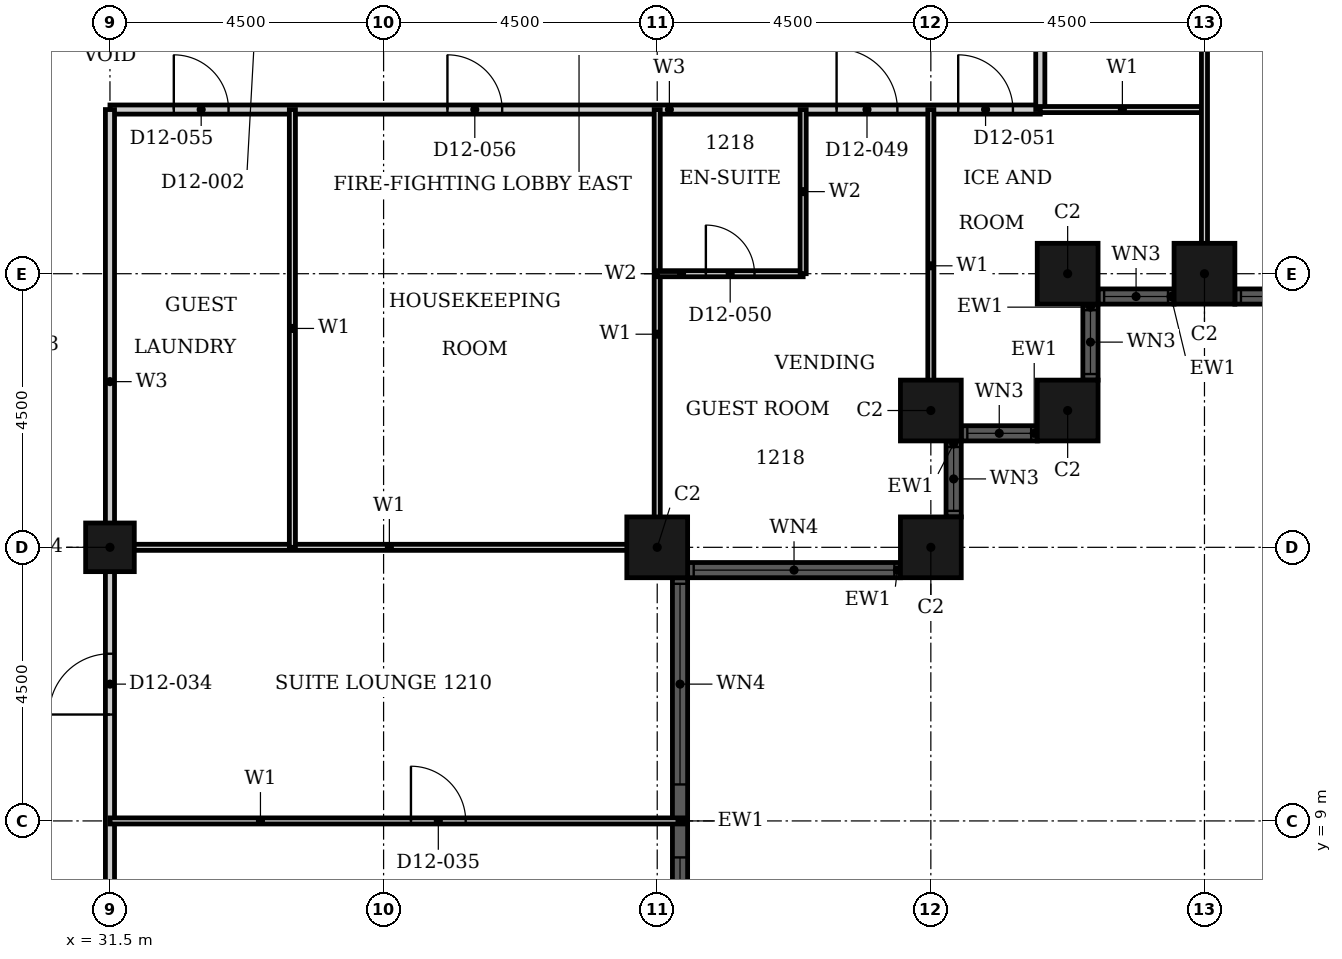
"""IFC4 building model, lengths in metres.
Left out: names, types, materials, properties, quantities, classifications, styles, units other than length and angle.
Written with IfcOpenShell. Run it as: python <this file> out.ifc"""

import sys

from ifc_helpers import new_model, si_unit, direction, frame, frame_2d, origin, origin_2d, place, context, subcontext, project, spatial, rectangle, hollow_rectangle, extrude, element, fill, save


model = new_model("IFC4")
c1 = context("Model", 3, precision=1e-05, world=origin(), true_north=direction((0.0, 1.0)))
c2 = subcontext(c1, "Body", "Model", "MODEL_VIEW")
j1 = project(units=[si_unit("LENGTHUNIT", "METRE"), si_unit("PLANEANGLEUNIT", "RADIAN")], contexts=[c1])
p1 = place(None, origin())
s1 = spatial("IfcSite", under=j1, at=p1, CompositionType="ELEMENT")
p2 = place(p1, origin())
s2 = spatial("IfcBuilding", under=s1, at=p2, CompositionType="ELEMENT")
p3 = place(p2, frame((0.0, 0.0, 56.4)))
s3 = spatial("IfcBuildingStorey", under=s2, at=p3, CompositionType="ELEMENT", Elevation=56.4)
for number, where, z_axis, x_axis in (
    (1, (40.5, 13.5, 0.0), (0.0, 0.0, 1.0), (1.0, 0.0, 0.0)),
    (2, (45.0, 13.5, 0.0), (0.0, 0.0, 1.0), (1.0, 0.0, 0.0)),
    (3, (45.0, 15.75, 0.0), (0.0, 0.0, 1.0), (1.0, 0.0, 0.0)),
    (4, (47.25, 15.75, 0.0), (0.0, 0.0, 1.0), (1.0, 0.0, 0.0)),
    (5, (47.25, 18.0, 0.0), (0.0, 0.0, 1.0), (1.0, 0.0, 0.0)),
    (6, (49.5, 18.0, 0.0), (0.0, 0.0, 1.0), (1.0, 0.0, 0.0)),
):
    element("IfcColumn", number, at=place(p3, frame(where, z_axis=z_axis, x_axis=x_axis)), inside=s3, PredefinedType="COLUMN", context=c2, shape_type="SweptSolid", body=[
        extrude(hollow_rectangle(XDim=1.0, YDim=1.0, WallThickness=0.032, at=origin_2d()), origin(), (0.0, 0.0, 1.0), 3.6),
    ])
p4 = place(p3, frame((31.5, 13.5, 0.0), z_axis=(0.0, 0.0, 1.0), x_axis=(1.0, 0.0, 0.0)))
e7 = element("IfcColumn", 7, at=p4, inside=s3, PredefinedType="COLUMN", context=c2, shape_type="SweptSolid", body=[
    extrude(hollow_rectangle(XDim=0.8, YDim=0.8, WallThickness=0.025, at=origin_2d()), origin(), (0.0, 0.0, 1.0), 3.6),
])
p5 = place(p3, frame((40.875, 5.0, 0.0), z_axis=(0.0, 0.0, 1.0), x_axis=(0.0, 1.0, 0.0)))
e8 = element("IfcWall", 8, at=p5, inside=s3, PredefinedType="SOLIDWALL", context=c2, shape_type="SweptSolid", body=[
    extrude(rectangle(XDim=8.0, YDim=0.25, at=frame_2d((4.0, 0.0))), origin(), (0.0, 0.0, 1.0), 3.6),
])
p6 = place(p5, frame((0.1, 0.0, 0.9)))
e9 = element("IfcOpeningElement", 9, at=p6, cuts=e8, PredefinedType="OPENING", context=c2, shape_type="SweptSolid", body=[
    extrude(rectangle(XDim=3.3, YDim=2.08, at=frame_2d((1.65, 1.04))), frame((0.0, 0.135, 0.0), z_axis=(0.0, -1.0, 0.0), x_axis=(1.0, 0.0, 0.0)), (0.0, 0.0, 1.0), 0.27),
])
p7 = place(p5, frame((4.6, 0.0, 0.9)))
e10 = element("IfcOpeningElement", 10, at=p7, cuts=e8, PredefinedType="OPENING", context=c2, shape_type="SweptSolid", body=[
    extrude(rectangle(XDim=3.3, YDim=2.08, at=frame_2d((1.65, 1.04))), frame((0.0, 0.135, 0.0), z_axis=(0.0, -1.0, 0.0), x_axis=(1.0, 0.0, 0.0)), (0.0, 0.0, 1.0), 0.27),
])
p8 = place(p3, frame((41.0, 13.125, 0.0), z_axis=(0.0, 0.0, 1.0), x_axis=(1.0, 0.0, 0.0)))
e11 = element("IfcWall", 11, at=p8, inside=s3, PredefinedType="SOLIDWALL", context=c2, shape_type="SweptSolid", body=[
    extrude(rectangle(XDim=3.5, YDim=0.25, at=frame_2d((1.75, 0.0))), origin(), (0.0, 0.0, 1.0), 3.6),
])
p9 = place(p8, frame((0.1, 0.0, 0.9)))
e12 = element("IfcOpeningElement", 12, at=p9, cuts=e11, PredefinedType="OPENING", context=c2, shape_type="SweptSolid", body=[
    extrude(rectangle(XDim=3.3, YDim=2.08, at=frame_2d((1.65, 1.04))), frame((0.0, 0.135, 0.0), z_axis=(0.0, -1.0, 0.0), x_axis=(1.0, 0.0, 0.0)), (0.0, 0.0, 1.0), 0.27),
])
p10 = place(p3, frame((45.375, 14.0, 0.0), z_axis=(0.0, 0.0, 1.0), x_axis=(0.0, 1.0, 0.0)))
e13 = element("IfcWall", 13, at=p10, inside=s3, PredefinedType="SOLIDWALL", context=c2, shape_type="SweptSolid", body=[
    extrude(rectangle(XDim=1.25, YDim=0.25, at=frame_2d((0.625, 0.0))), origin(), (0.0, 0.0, 1.0), 3.6),
])
p11 = place(p10, frame((0.1, 0.0, 0.9)))
e14 = element("IfcOpeningElement", 14, at=p11, cuts=e13, PredefinedType="OPENING", context=c2, shape_type="SweptSolid", body=[
    extrude(rectangle(XDim=1.05, YDim=2.08, at=frame_2d((0.525, 1.04))), frame((0.0, 0.135, 0.0), z_axis=(0.0, -1.0, 0.0), x_axis=(1.0, 0.0, 0.0)), (0.0, 0.0, 1.0), 0.27),
])
p12 = place(p3, frame((45.5, 15.375, 0.0), z_axis=(0.0, 0.0, 1.0), x_axis=(1.0, 0.0, 0.0)))
e15 = element("IfcWall", 15, at=p12, inside=s3, PredefinedType="SOLIDWALL", context=c2, shape_type="SweptSolid", body=[
    extrude(rectangle(XDim=1.25, YDim=0.25, at=frame_2d((0.625, 0.0))), origin(), (0.0, 0.0, 1.0), 3.6),
])
p13 = place(p12, frame((0.1, 0.0, 0.9)))
e16 = element("IfcOpeningElement", 16, at=p13, cuts=e15, PredefinedType="OPENING", context=c2, shape_type="SweptSolid", body=[
    extrude(rectangle(XDim=1.05, YDim=2.08, at=frame_2d((0.525, 1.04))), frame((0.0, 0.135, 0.0), z_axis=(0.0, -1.0, 0.0), x_axis=(1.0, 0.0, 0.0)), (0.0, 0.0, 1.0), 0.27),
])
p14 = place(p3, frame((47.625, 16.25, 0.0), z_axis=(0.0, 0.0, 1.0), x_axis=(0.0, 1.0, 0.0)))
e17 = element("IfcWall", 17, at=p14, inside=s3, PredefinedType="SOLIDWALL", context=c2, shape_type="SweptSolid", body=[
    extrude(rectangle(XDim=1.25, YDim=0.25, at=frame_2d((0.625, 0.0))), origin(), (0.0, 0.0, 1.0), 3.6),
])
p15 = place(p14, frame((0.1, 0.0, 0.9)))
e18 = element("IfcOpeningElement", 18, at=p15, cuts=e17, PredefinedType="OPENING", context=c2, shape_type="SweptSolid", body=[
    extrude(rectangle(XDim=1.05, YDim=2.08, at=frame_2d((0.525, 1.04))), frame((0.0, 0.135, 0.0), z_axis=(0.0, -1.0, 0.0), x_axis=(1.0, 0.0, 0.0)), (0.0, 0.0, 1.0), 0.27),
])
p16 = place(p3, frame((47.75, 17.625, 0.0), z_axis=(0.0, 0.0, 1.0), x_axis=(1.0, 0.0, 0.0)))
e19 = element("IfcWall", 19, at=p16, inside=s3, PredefinedType="SOLIDWALL", context=c2, shape_type="SweptSolid", body=[
    extrude(rectangle(XDim=1.25, YDim=0.25, at=frame_2d((0.625, 0.0))), origin(), (0.0, 0.0, 1.0), 3.6),
])
p17 = place(p16, frame((0.1, 0.0, 0.9)))
e20 = element("IfcOpeningElement", 20, at=p17, cuts=e19, PredefinedType="OPENING", context=c2, shape_type="SweptSolid", body=[
    extrude(rectangle(XDim=1.05, YDim=2.08, at=frame_2d((0.525, 1.04))), frame((0.0, 0.135, 0.0), z_axis=(0.0, -1.0, 0.0), x_axis=(1.0, 0.0, 0.0)), (0.0, 0.0, 1.0), 0.27),
])
p18 = place(p3, frame((50.0, 17.625, 0.0), z_axis=(0.0, 0.0, 1.0), x_axis=(1.0, 0.0, 0.0)))
e21 = element("IfcWall", 21, at=p18, inside=s3, PredefinedType="SOLIDWALL", context=c2, shape_type="SweptSolid", body=[
    extrude(rectangle(XDim=8.0, YDim=0.25, at=frame_2d((4.0, 0.0))), origin(), (0.0, 0.0, 1.0), 3.6),
])
p19 = place(p18, frame((0.1, 0.0, 0.9)))
e22 = element("IfcOpeningElement", 22, at=p19, cuts=e21, PredefinedType="OPENING", context=c2, shape_type="SweptSolid", body=[
    extrude(rectangle(XDim=3.3, YDim=2.08, at=frame_2d((1.65, 1.04))), frame((0.0, 0.135, 0.0), z_axis=(0.0, -1.0, 0.0), x_axis=(1.0, 0.0, 0.0)), (0.0, 0.0, 1.0), 0.27),
])
p20 = place(p18, frame((4.6, 0.0, 0.9)))
e23 = element("IfcOpeningElement", 23, at=p20, cuts=e21, PredefinedType="OPENING", context=c2, shape_type="SweptSolid", body=[
    extrude(rectangle(XDim=3.3, YDim=2.08, at=frame_2d((1.65, 1.04))), frame((0.0, 0.135, 0.0), z_axis=(0.0, -1.0, 0.0), x_axis=(1.0, 0.0, 0.0)), (0.0, 0.0, 1.0), 0.27),
])
p21 = place(p3, frame((31.5, 20.7, 0.0), z_axis=(0.0, 0.0, 1.0), x_axis=(1.0, 0.0, 0.0)))
e24 = element("IfcWall", 24, at=p21, inside=s3, PredefinedType="PARTITIONING", context=c2, shape_type="SweptSolid", body=[
    extrude(rectangle(XDim=15.3, YDim=0.15, at=frame_2d((7.65, 0.0))), origin(), (0.0, 0.0, 1.0), 3.3),
])
p22 = place(p21, frame((11.95, 0.0, 0.0)))
e25 = element("IfcOpeningElement", 25, at=p22, cuts=e24, PredefinedType="OPENING", context=c2, shape_type="SweptSolid", body=[
    extrude(rectangle(XDim=1.0, YDim=2.1, at=frame_2d((0.5, 1.05))), frame((0.0, 0.085, 0.0), z_axis=(0.0, -1.0, 0.0), x_axis=(1.0, 0.0, 0.0)), (0.0, 0.0, 1.0), 0.17),
])
p23 = place(p21, frame((13.95, 0.0, 0.0)))
e26 = element("IfcOpeningElement", 26, at=p23, cuts=e24, PredefinedType="OPENING", context=c2, shape_type="SweptSolid", body=[
    extrude(rectangle(XDim=0.9, YDim=2.1, at=frame_2d((0.45, 1.05))), frame((0.0, 0.085, 0.0), z_axis=(0.0, -1.0, 0.0), x_axis=(1.0, 0.0, 0.0)), (0.0, 0.0, 1.0), 0.17),
])
p24 = place(p21, frame((1.05, 0.0, 0.0)))
e27 = element("IfcOpeningElement", 27, at=p24, cuts=e24, PredefinedType="OPENING", context=c2, shape_type="SweptSolid", body=[
    extrude(rectangle(XDim=0.9, YDim=2.1, at=frame_2d((0.45, 1.05))), frame((0.0, 0.085, 0.0), z_axis=(0.0, -1.0, 0.0), x_axis=(1.0, 0.0, 0.0)), (0.0, 0.0, 1.0), 0.17),
])
p25 = place(p21, frame((5.55, 0.0, 0.0)))
e28 = element("IfcOpeningElement", 28, at=p25, cuts=e24, PredefinedType="OPENING", context=c2, shape_type="SweptSolid", body=[
    extrude(rectangle(XDim=0.9, YDim=2.1, at=frame_2d((0.45, 1.05))), frame((0.0, 0.085, 0.0), z_axis=(0.0, -1.0, 0.0), x_axis=(1.0, 0.0, 0.0)), (0.0, 0.0, 1.0), 0.17),
])
p26 = place(p3, frame((31.5, 4.5, 0.0), z_axis=(0.0, 0.0, 1.0), x_axis=(0.0, 1.0, 0.0)))
e29 = element("IfcWall", 29, at=p26, inside=s3, PredefinedType="PARTITIONING", context=c2, shape_type="SweptSolid", body=[
    extrude(rectangle(XDim=16.2, YDim=0.15, at=frame_2d((8.1, 0.0))), origin(), (0.0, 0.0, 1.0), 2.58),
])
p27 = place(p26, frame((6.25, 0.0, 0.0)))
e30 = element("IfcOpeningElement", 30, at=p27, cuts=e29, PredefinedType="OPENING", context=c2, shape_type="SweptSolid", body=[
    extrude(rectangle(XDim=1.0, YDim=2.1, at=frame_2d((0.5, 1.05))), frame((0.0, 0.085, 0.0), z_axis=(0.0, -1.0, 0.0), x_axis=(1.0, 0.0, 0.0)), (0.0, 0.0, 1.0), 0.17),
])
p28 = place(p3, frame((46.8, 20.7, 0.0), z_axis=(0.0, 0.0, 1.0), x_axis=(0.0, 1.0, 0.0)))
e31 = element("IfcWall", 31, at=p28, inside=s3, PredefinedType="PARTITIONING", context=c2, shape_type="SweptSolid", body=[
    extrude(rectangle(XDim=6.3, YDim=0.15, at=frame_2d((3.15, 0.0))), origin(), (0.0, 0.0, 1.0), 3.3),
])
p29 = place(p28, frame((2.625, 0.0, 0.0)))
e32 = element("IfcOpeningElement", 32, at=p29, cuts=e31, PredefinedType="OPENING", context=c2, shape_type="SweptSolid", body=[
    extrude(rectangle(XDim=0.95, YDim=2.1, at=frame_2d((0.475, 1.05))), frame((0.0, 0.085, 0.0), z_axis=(0.0, -1.0, 0.0), x_axis=(1.0, 0.0, 0.0)), (0.0, 0.0, 1.0), 0.17),
])
p30 = place(p3, frame((31.5, 13.5, 0.0), z_axis=(0.0, 0.0, 1.0), x_axis=(1.0, 0.0, 0.0)))
e33 = element("IfcWall", 33, at=p30, inside=s3, PredefinedType="PARTITIONING", context=c2, shape_type="SweptSolid", body=[
    extrude(rectangle(XDim=9.19, YDim=0.1, at=frame_2d((4.595, 0.0))), origin(), (0.0, 0.0, 1.0), 2.38),
])
p31 = place(p3, frame((46.8, 20.7, 0.0), z_axis=(0.0, 0.0, 1.0), x_axis=(1.0, 0.0, 0.0)))
e34 = element("IfcWall", 34, at=p31, inside=s3, PredefinedType="PARTITIONING", context=c2, shape_type="SweptSolid", body=[
    extrude(rectangle(XDim=2.7, YDim=0.1, at=frame_2d((1.35, 0.0))), origin(), (0.0, 0.0, 1.0), 3.3),
])
p32 = place(p3, frame((31.5, 9.0, 0.0), z_axis=(0.0, 0.0, 1.0), x_axis=(1.0, 0.0, 0.0)))
e35 = element("IfcWall", 35, at=p32, inside=s3, PredefinedType="PARTITIONING", context=c2, shape_type="SweptSolid", body=[
    extrude(rectangle(XDim=9.44, YDim=0.1, at=frame_2d((4.72, 0.0))), origin(), (0.0, 0.0, 1.0), 3.3),
])
p33 = place(p32, frame((4.95, 0.0, 0.0)))
e36 = element("IfcOpeningElement", 36, at=p33, cuts=e35, PredefinedType="OPENING", context=c2, shape_type="SweptSolid", body=[
    extrude(rectangle(XDim=0.9, YDim=2.1, at=frame_2d((0.45, 1.05))), frame((0.0, 0.06, 0.0), z_axis=(0.0, -1.0, 0.0), x_axis=(1.0, 0.0, 0.0)), (0.0, 0.0, 1.0), 0.12),
])
p34 = place(p3, frame((34.5, 13.5, 0.0), z_axis=(0.0, 0.0, 1.0), x_axis=(0.0, 1.0, 0.0)))
e37 = element("IfcWall", 37, at=p34, inside=s3, PredefinedType="PARTITIONING", context=c2, shape_type="SweptSolid", body=[
    extrude(rectangle(XDim=7.2, YDim=0.1, at=frame_2d((3.6, 0.0))), origin(), (0.0, 0.0, 1.0), 3.3),
])
p35 = place(p3, frame((40.5, 13.31, 0.0), z_axis=(0.0, 0.0, 1.0), x_axis=(0.0, 1.0, 0.0)))
e38 = element("IfcWall", 38, at=p35, inside=s3, PredefinedType="PARTITIONING", context=c2, shape_type="SweptSolid", body=[
    extrude(rectangle(XDim=7.39, YDim=0.1, at=frame_2d((3.695, 0.0))), origin(), (0.0, 0.0, 1.0), 3.3),
])
p36 = place(p3, frame((45.0, 15.56, 0.0), z_axis=(0.0, 0.0, 1.0), x_axis=(0.0, 1.0, 0.0)))
e39 = element("IfcWall", 39, at=p36, inside=s3, PredefinedType="PARTITIONING", context=c2, shape_type="SweptSolid", body=[
    extrude(rectangle(XDim=5.14, YDim=0.1, at=frame_2d((2.57, 0.0))), origin(), (0.0, 0.0, 1.0), 3.3),
])
p37 = place(p3, frame((49.5, 17.81, 0.0), z_axis=(0.0, 0.0, 1.0), x_axis=(0.0, 1.0, 0.0)))
e40 = element("IfcWall", 40, at=p37, inside=s3, PredefinedType="PARTITIONING", context=c2, shape_type="SweptSolid", body=[
    extrude(rectangle(XDim=9.19, YDim=0.1, at=frame_2d((4.595, 0.0))), origin(), (0.0, 0.0, 1.0), 2.38),
])
p38 = place(p3, frame((40.5, 18.0, 0.0), z_axis=(0.0, 0.0, 1.0), x_axis=(1.0, 0.0, 0.0)))
e41 = element("IfcWall", 41, at=p38, inside=s3, PredefinedType="PARTITIONING", context=c2, shape_type="SweptSolid", body=[
    extrude(rectangle(XDim=2.4, YDim=0.1, at=frame_2d((1.2, 0.0))), origin(), (0.0, 0.0, 1.0), 3.3),
])
p39 = place(p38, frame((0.8, 0.0, 0.0)))
e42 = element("IfcOpeningElement", 42, at=p39, cuts=e41, PredefinedType="OPENING", context=c2, shape_type="SweptSolid", body=[
    extrude(rectangle(XDim=0.8, YDim=2.1, at=frame_2d((0.4, 1.05))), frame((0.0, 0.06, 0.0), z_axis=(0.0, -1.0, 0.0), x_axis=(1.0, 0.0, 0.0)), (0.0, 0.0, 1.0), 0.12),
])
p40 = place(p3, frame((42.9, 18.0, 0.0), z_axis=(0.0, 0.0, 1.0), x_axis=(0.0, 1.0, 0.0)))
e43 = element("IfcWall", 43, at=p40, inside=s3, PredefinedType="PARTITIONING", context=c2, shape_type="SweptSolid", body=[
    extrude(rectangle(XDim=2.7, YDim=0.1, at=frame_2d((1.35, 0.0))), origin(), (0.0, 0.0, 1.0), 3.3),
])
p41 = place(p6, origin())
e44 = element("IfcWindow", 44, at=p41, inside=s3, PartitioningType="SINGLE_PANEL", PredefinedType="WINDOW", context=c2, shape_type="SweptSolid", body=[
    extrude(rectangle(XDim=3.3, YDim=2.08, at=frame_2d((1.65, 1.04))), frame((0.0, 0.03, 0.0), z_axis=(0.0, -1.0, 0.0), x_axis=(1.0, 0.0, 0.0)), (0.0, 0.0, 1.0), 0.06),
])
fill(e9, e44)
p42 = place(p7, origin())
e45 = element("IfcWindow", 45, at=p42, inside=s3, PartitioningType="SINGLE_PANEL", PredefinedType="WINDOW", context=c2, shape_type="SweptSolid", body=[
    extrude(rectangle(XDim=3.3, YDim=2.08, at=frame_2d((1.65, 1.04))), frame((0.0, 0.03, 0.0), z_axis=(0.0, -1.0, 0.0), x_axis=(1.0, 0.0, 0.0)), (0.0, 0.0, 1.0), 0.06),
])
fill(e10, e45)
p43 = place(p9, origin())
e46 = element("IfcWindow", 46, at=p43, inside=s3, PartitioningType="SINGLE_PANEL", PredefinedType="WINDOW", context=c2, shape_type="SweptSolid", body=[
    extrude(rectangle(XDim=3.3, YDim=2.08, at=frame_2d((1.65, 1.04))), frame((0.0, 0.03, 0.0), z_axis=(0.0, -1.0, 0.0), x_axis=(1.0, 0.0, 0.0)), (0.0, 0.0, 1.0), 0.06),
])
fill(e12, e46)
p44 = place(p11, origin())
e47 = element("IfcWindow", 47, at=p44, inside=s3, PartitioningType="SINGLE_PANEL", PredefinedType="WINDOW", context=c2, shape_type="SweptSolid", body=[
    extrude(rectangle(XDim=1.05, YDim=2.08, at=frame_2d((0.525, 1.04))), frame((0.0, 0.03, 0.0), z_axis=(0.0, -1.0, 0.0), x_axis=(1.0, 0.0, 0.0)), (0.0, 0.0, 1.0), 0.06),
])
fill(e14, e47)
p45 = place(p13, origin())
e48 = element("IfcWindow", 48, at=p45, inside=s3, PartitioningType="SINGLE_PANEL", PredefinedType="WINDOW", context=c2, shape_type="SweptSolid", body=[
    extrude(rectangle(XDim=1.05, YDim=2.08, at=frame_2d((0.525, 1.04))), frame((0.0, 0.03, 0.0), z_axis=(0.0, -1.0, 0.0), x_axis=(1.0, 0.0, 0.0)), (0.0, 0.0, 1.0), 0.06),
])
fill(e16, e48)
p46 = place(p15, origin())
e49 = element("IfcWindow", 49, at=p46, inside=s3, PartitioningType="SINGLE_PANEL", PredefinedType="WINDOW", context=c2, shape_type="SweptSolid", body=[
    extrude(rectangle(XDim=1.05, YDim=2.08, at=frame_2d((0.525, 1.04))), frame((0.0, 0.03, 0.0), z_axis=(0.0, -1.0, 0.0), x_axis=(1.0, 0.0, 0.0)), (0.0, 0.0, 1.0), 0.06),
])
fill(e18, e49)
p47 = place(p17, origin())
e50 = element("IfcWindow", 50, at=p47, inside=s3, PartitioningType="SINGLE_PANEL", PredefinedType="WINDOW", context=c2, shape_type="SweptSolid", body=[
    extrude(rectangle(XDim=1.05, YDim=2.08, at=frame_2d((0.525, 1.04))), frame((0.0, 0.03, 0.0), z_axis=(0.0, -1.0, 0.0), x_axis=(1.0, 0.0, 0.0)), (0.0, 0.0, 1.0), 0.06),
])
fill(e20, e50)
p48 = place(p19, origin())
e51 = element("IfcWindow", 51, at=p48, inside=s3, PartitioningType="SINGLE_PANEL", PredefinedType="WINDOW", context=c2, shape_type="SweptSolid", body=[
    extrude(rectangle(XDim=3.3, YDim=2.08, at=frame_2d((1.65, 1.04))), frame((0.0, 0.03, 0.0), z_axis=(0.0, -1.0, 0.0), x_axis=(1.0, 0.0, 0.0)), (0.0, 0.0, 1.0), 0.06),
])
fill(e22, e51)
p49 = place(p27, origin())
e52 = element("IfcDoor", 52, at=p49, inside=s3, OperationType="SINGLE_SWING_LEFT", PredefinedType="DOOR", context=c2, shape_type="SweptSolid", body=[
    extrude(rectangle(XDim=1.0, YDim=2.1, at=frame_2d((0.5, 1.05))), frame((0.0, 0.025, 0.0), z_axis=(0.0, -1.0, 0.0), x_axis=(1.0, 0.0, 0.0)), (0.0, 0.0, 1.0), 0.05),
])
fill(e30, e52)
p50 = place(p33, origin())
e53 = element("IfcDoor", 53, at=p50, inside=s3, OperationType="SINGLE_SWING_RIGHT", PredefinedType="DOOR", context=c2, shape_type="SweptSolid", body=[
    extrude(rectangle(XDim=0.9, YDim=2.1, at=frame_2d((0.45, 1.05))), frame((0.0, 0.025, 0.0), z_axis=(0.0, -1.0, 0.0), x_axis=(1.0, 0.0, 0.0)), (0.0, 0.0, 1.0), 0.05),
])
fill(e36, e53)
p51 = place(p22, origin())
e54 = element("IfcDoor", 54, at=p51, inside=s3, OperationType="SINGLE_SWING_RIGHT", PredefinedType="DOOR", context=c2, shape_type="SweptSolid", body=[
    extrude(rectangle(XDim=1.0, YDim=2.1, at=frame_2d((0.5, 1.05))), frame((0.0, 0.025, 0.0), z_axis=(0.0, -1.0, 0.0), x_axis=(1.0, 0.0, 0.0)), (0.0, 0.0, 1.0), 0.05),
])
fill(e25, e54)
p52 = place(p39, origin())
e55 = element("IfcDoor", 55, at=p52, inside=s3, OperationType="SINGLE_SWING_RIGHT", PredefinedType="DOOR", context=c2, shape_type="SweptSolid", body=[
    extrude(rectangle(XDim=0.8, YDim=2.1, at=frame_2d((0.4, 1.05))), frame((0.0, 0.025, 0.0), z_axis=(0.0, -1.0, 0.0), x_axis=(1.0, 0.0, 0.0)), (0.0, 0.0, 1.0), 0.05),
])
fill(e42, e55)
p53 = place(p23, origin())
e56 = element("IfcDoor", 56, at=p53, inside=s3, OperationType="SINGLE_SWING_LEFT", PredefinedType="DOOR", context=c2, shape_type="SweptSolid", body=[
    extrude(rectangle(XDim=0.9, YDim=2.1, at=frame_2d((0.45, 1.05))), frame((0.0, 0.025, 0.0), z_axis=(0.0, -1.0, 0.0), x_axis=(1.0, 0.0, 0.0)), (0.0, 0.0, 1.0), 0.05),
])
fill(e26, e56)
p54 = place(p24, origin())
e57 = element("IfcDoor", 57, at=p54, inside=s3, OperationType="SINGLE_SWING_RIGHT", PredefinedType="DOOR", context=c2, shape_type="SweptSolid", body=[
    extrude(rectangle(XDim=0.9, YDim=2.1, at=frame_2d((0.45, 1.05))), frame((0.0, 0.025, 0.0), z_axis=(0.0, -1.0, 0.0), x_axis=(1.0, 0.0, 0.0)), (0.0, 0.0, 1.0), 0.05),
])
fill(e27, e57)
p55 = place(p25, origin())
e58 = element("IfcDoor", 58, at=p55, inside=s3, OperationType="SINGLE_SWING_LEFT", PredefinedType="DOOR", context=c2, shape_type="SweptSolid", body=[
    extrude(rectangle(XDim=0.9, YDim=2.1, at=frame_2d((0.45, 1.05))), frame((0.0, 0.025, 0.0), z_axis=(0.0, -1.0, 0.0), x_axis=(1.0, 0.0, 0.0)), (0.0, 0.0, 1.0), 0.05),
])
fill(e28, e58)
save(model, sys.argv[1])
